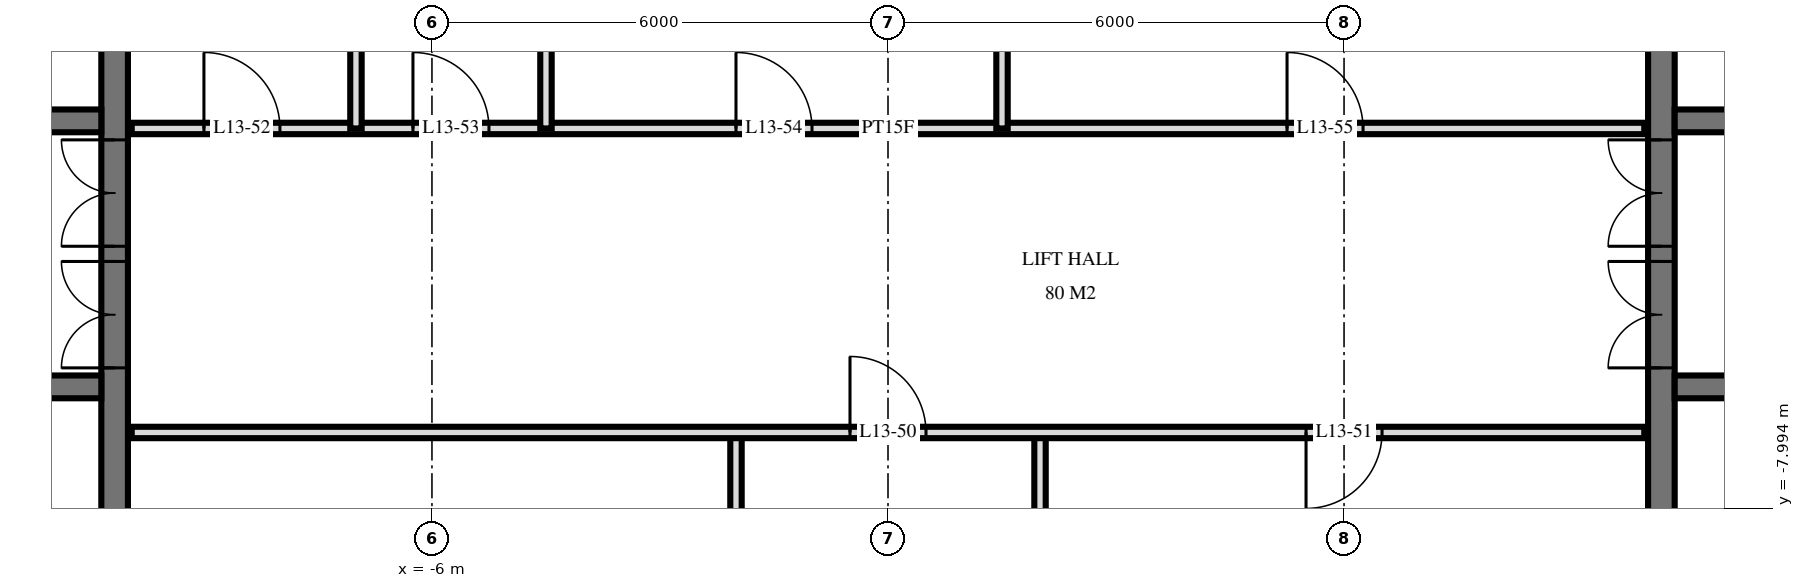
"""IFC4 building model, lengths in metres.
Left out: names, types, materials, properties, quantities, classifications, styles, units other than length and angle.
Written with IfcOpenShell. Run it as: python <this file> out.ifc"""

import sys

from ifc_helpers import new_model, si_unit, direction, frame, frame_2d, origin, place, context, subcontext, project, spatial, rectangle, extrude, element, fill, save


model = new_model("IFC4")
c1 = context("Model", 3, precision=1e-05, world=origin(), true_north=direction((0.0, 1.0)))
c2 = subcontext(c1, "Body", "Model", "MODEL_VIEW")
j1 = project(units=[si_unit("LENGTHUNIT", "METRE"), si_unit("PLANEANGLEUNIT", "RADIAN")], contexts=[c1])
p1 = place(None, origin())
s1 = spatial("IfcSite", under=j1, at=p1, CompositionType="ELEMENT")
p2 = place(p1, origin())
s2 = spatial("IfcBuilding", under=s1, at=p2, CompositionType="ELEMENT")
p3 = place(p2, frame((0.0, 0.0, 56.4)))
s3 = spatial("IfcBuildingStorey", under=s2, at=p3, CompositionType="ELEMENT", Elevation=56.4)
p4 = place(p3, frame((-10.175, -14.55, 0.0), z_axis=(0.0, 0.0, 1.0), x_axis=(0.0, 1.0, 0.0)))
e1 = element("IfcWall", 1, at=p4, inside=s3, PredefinedType="SHEAR", context=c2, shape_type="SweptSolid", body=[
    extrude(rectangle(XDim=14.1, YDim=0.35, at=frame_2d((7.05, 0.0))), origin(), (0.0, 0.0, 1.0), 3.6),
])
p5 = place(p4, frame((8.4, 0.0, 0.0)))
e2 = element("IfcOpeningElement", 2, at=p5, cuts=e1, PredefinedType="OPENING", context=c2, shape_type="SweptSolid", body=[
    extrude(rectangle(XDim=1.4, YDim=2.4, at=frame_2d((0.7, 1.2))), frame((0.0, 0.185, 0.0), z_axis=(0.0, -1.0, 0.0), x_axis=(1.0, 0.0, 0.0)), (0.0, 0.0, 1.0), 0.37),
])
p6 = place(p4, frame((10.0, 0.0, 0.0)))
e3 = element("IfcOpeningElement", 3, at=p6, cuts=e1, PredefinedType="OPENING", context=c2, shape_type="SweptSolid", body=[
    extrude(rectangle(XDim=1.4, YDim=2.4, at=frame_2d((0.7, 1.2))), frame((0.0, 0.185, 0.0), z_axis=(0.0, -1.0, 0.0), x_axis=(1.0, 0.0, 0.0)), (0.0, 0.0, 1.0), 0.37),
])
p7 = place(p4, frame((4.0, 0.0, 0.0)))
e4 = element("IfcOpeningElement", 4, at=p7, cuts=e1, PredefinedType="OPENING", context=c2, shape_type="SweptSolid", body=[
    extrude(rectangle(XDim=1.2, YDim=2.1, at=frame_2d((0.6, 1.05))), frame((0.0, 0.185, 0.0), z_axis=(0.0, -1.0, 0.0), x_axis=(1.0, 0.0, 0.0)), (0.0, 0.0, 1.0), 0.37),
])
p8 = place(p3, frame((-29.05, -2.9, 0.0), z_axis=(0.0, 0.0, 1.0), x_axis=(1.0, 0.0, 0.0)))
e5 = element("IfcWall", 5, at=p8, inside=s3, PredefinedType="SHEAR", context=c2, shape_type="SweptSolid", body=[
    extrude(rectangle(XDim=18.7, YDim=0.3, at=frame_2d((9.35, 0.0))), origin(), (0.0, 0.0, 1.0), 3.6),
])
p9 = place(p8, frame((2.95, 0.0, 0.0)))
e6 = element("IfcOpeningElement", 6, at=p9, cuts=e5, PredefinedType="OPENING", context=c2, shape_type="SweptSolid", body=[
    extrude(rectangle(XDim=1.1, YDim=2.1, at=frame_2d((0.55, 1.05))), frame((0.0, 0.16, 0.0), z_axis=(0.0, -1.0, 0.0), x_axis=(1.0, 0.0, 0.0)), (0.0, 0.0, 1.0), 0.32),
])
p10 = place(p8, frame((0.55, 0.0, 0.0)))
e7 = element("IfcOpeningElement", 7, at=p10, cuts=e5, PredefinedType="OPENING", context=c2, shape_type="SweptSolid", body=[
    extrude(rectangle(XDim=1.1, YDim=2.1, at=frame_2d((0.55, 1.05))), frame((0.0, 0.16, 0.0), z_axis=(0.0, -1.0, 0.0), x_axis=(1.0, 0.0, 0.0)), (0.0, 0.0, 1.0), 0.32),
])
p11 = place(p8, frame((10.9, 0.0, 0.0)))
e8 = element("IfcOpeningElement", 8, at=p11, cuts=e5, PredefinedType="OPENING", context=c2, shape_type="SweptSolid", body=[
    extrude(rectangle(XDim=0.9, YDim=2.1, at=frame_2d((0.45, 1.05))), frame((0.0, 0.16, 0.0), z_axis=(0.0, -1.0, 0.0), x_axis=(1.0, 0.0, 0.0)), (0.0, 0.0, 1.0), 0.32),
])
p12 = place(p8, frame((16.85, 0.0, 0.0)))
e9 = element("IfcOpeningElement", 9, at=p12, cuts=e5, PredefinedType="OPENING", context=c2, shape_type="SweptSolid", body=[
    extrude(rectangle(XDim=1.0, YDim=2.1, at=frame_2d((0.5, 1.05))), frame((0.0, 0.16, 0.0), z_axis=(0.0, -1.0, 0.0), x_axis=(1.0, 0.0, 0.0)), (0.0, 0.0, 1.0), 0.32),
])
p13 = place(p8, frame((13.85, 0.0, 0.0)))
e10 = element("IfcOpeningElement", 10, at=p13, cuts=e5, PredefinedType="OPENING", context=c2, shape_type="SweptSolid", body=[
    extrude(rectangle(XDim=1.0, YDim=2.1, at=frame_2d((0.5, 1.05))), frame((0.0, 0.16, 0.0), z_axis=(0.0, -1.0, 0.0), x_axis=(1.0, 0.0, 0.0)), (0.0, 0.0, 1.0), 0.32),
])
p14 = place(p8, frame((5.6, 0.0, 0.0)))
e11 = element("IfcOpeningElement", 11, at=p14, cuts=e5, PredefinedType="OPENING", context=c2, shape_type="SweptSolid", body=[
    extrude(rectangle(XDim=1.0, YDim=2.1, at=frame_2d((0.5, 1.05))), frame((0.0, 0.16, 0.0), z_axis=(0.0, -1.0, 0.0), x_axis=(1.0, 0.0, 0.0)), (0.0, 0.0, 1.0), 0.32),
])
p15 = place(p3, frame((-29.05, -6.4, 0.0), z_axis=(0.0, 0.0, 1.0), x_axis=(1.0, 0.0, 0.0)))
e12 = element("IfcWall", 12, at=p15, inside=s3, PredefinedType="SHEAR", context=c2, shape_type="SweptSolid", body=[
    extrude(rectangle(XDim=18.7, YDim=0.3, at=frame_2d((9.35, 0.0))), origin(), (0.0, 0.0, 1.0), 3.6),
])
p16 = place(p15, frame((2.95, 0.0, 0.0)))
e13 = element("IfcOpeningElement", 13, at=p16, cuts=e12, PredefinedType="OPENING", context=c2, shape_type="SweptSolid", body=[
    extrude(rectangle(XDim=1.1, YDim=2.1, at=frame_2d((0.55, 1.05))), frame((0.0, 0.16, 0.0), z_axis=(0.0, -1.0, 0.0), x_axis=(1.0, 0.0, 0.0)), (0.0, 0.0, 1.0), 0.32),
])
p17 = place(p15, frame((0.55, 0.0, 0.0)))
e14 = element("IfcOpeningElement", 14, at=p17, cuts=e12, PredefinedType="OPENING", context=c2, shape_type="SweptSolid", body=[
    extrude(rectangle(XDim=1.1, YDim=2.1, at=frame_2d((0.55, 1.05))), frame((0.0, 0.16, 0.0), z_axis=(0.0, -1.0, 0.0), x_axis=(1.0, 0.0, 0.0)), (0.0, 0.0, 1.0), 0.32),
])
p18 = place(p15, frame((10.8, 0.0, 0.0)))
e15 = element("IfcOpeningElement", 15, at=p18, cuts=e12, PredefinedType="OPENING", context=c2, shape_type="SweptSolid", body=[
    extrude(rectangle(XDim=1.1, YDim=2.1, at=frame_2d((0.55, 1.05))), frame((0.0, 0.16, 0.0), z_axis=(0.0, -1.0, 0.0), x_axis=(1.0, 0.0, 0.0)), (0.0, 0.0, 1.0), 0.32),
])
p19 = place(p15, frame((5.6, 0.0, 0.0)))
e16 = element("IfcOpeningElement", 16, at=p19, cuts=e12, PredefinedType="OPENING", context=c2, shape_type="SweptSolid", body=[
    extrude(rectangle(XDim=1.0, YDim=2.1, at=frame_2d((0.5, 1.05))), frame((0.0, 0.16, 0.0), z_axis=(0.0, -1.0, 0.0), x_axis=(1.0, 0.0, 0.0)), (0.0, 0.0, 1.0), 0.32),
])
p20 = place(p3, frame((10.175, -14.55, 0.0), z_axis=(0.0, 0.0, 1.0), x_axis=(0.0, 1.0, 0.0)))
e17 = element("IfcWall", 17, at=p20, inside=s3, PredefinedType="SHEAR", context=c2, shape_type="SweptSolid", body=[
    extrude(rectangle(XDim=14.1, YDim=0.35, at=frame_2d((7.05, 0.0))), origin(), (0.0, 0.0, 1.0), 3.6),
])
p21 = place(p20, frame((8.4, 0.0, 0.0)))
e18 = element("IfcOpeningElement", 18, at=p21, cuts=e17, PredefinedType="OPENING", context=c2, shape_type="SweptSolid", body=[
    extrude(rectangle(XDim=1.4, YDim=2.4, at=frame_2d((0.7, 1.2))), frame((0.0, 0.185, 0.0), z_axis=(0.0, -1.0, 0.0), x_axis=(1.0, 0.0, 0.0)), (0.0, 0.0, 1.0), 0.37),
])
p22 = place(p20, frame((10.0, 0.0, 0.0)))
e19 = element("IfcOpeningElement", 19, at=p22, cuts=e17, PredefinedType="OPENING", context=c2, shape_type="SweptSolid", body=[
    extrude(rectangle(XDim=1.4, YDim=2.4, at=frame_2d((0.7, 1.2))), frame((0.0, 0.185, 0.0), z_axis=(0.0, -1.0, 0.0), x_axis=(1.0, 0.0, 0.0)), (0.0, 0.0, 1.0), 0.37),
])
p23 = place(p20, frame((4.0, 0.0, 0.0)))
e20 = element("IfcOpeningElement", 20, at=p23, cuts=e17, PredefinedType="OPENING", context=c2, shape_type="SweptSolid", body=[
    extrude(rectangle(XDim=1.2, YDim=2.1, at=frame_2d((0.6, 1.05))), frame((0.0, 0.185, 0.0), z_axis=(0.0, -1.0, 0.0), x_axis=(1.0, 0.0, 0.0)), (0.0, 0.0, 1.0), 0.37),
])
p24 = place(p3, frame((10.35, -2.9, 0.0), z_axis=(0.0, 0.0, 1.0), x_axis=(1.0, 0.0, 0.0)))
e21 = element("IfcWall", 21, at=p24, inside=s3, PredefinedType="SHEAR", context=c2, shape_type="SweptSolid", body=[
    extrude(rectangle(XDim=18.7, YDim=0.3, at=frame_2d((9.35, 0.0))), origin(), (0.0, 0.0, 1.0), 3.6),
])
p25 = place(p24, frame((14.65, 0.0, 0.0)))
e22 = element("IfcOpeningElement", 22, at=p25, cuts=e21, PredefinedType="OPENING", context=c2, shape_type="SweptSolid", body=[
    extrude(rectangle(XDim=1.1, YDim=2.1, at=frame_2d((0.55, 1.05))), frame((0.0, 0.16, 0.0), z_axis=(0.0, -1.0, 0.0), x_axis=(1.0, 0.0, 0.0)), (0.0, 0.0, 1.0), 0.32),
])
p26 = place(p24, frame((17.05, 0.0, 0.0)))
e23 = element("IfcOpeningElement", 23, at=p26, cuts=e21, PredefinedType="OPENING", context=c2, shape_type="SweptSolid", body=[
    extrude(rectangle(XDim=1.1, YDim=2.1, at=frame_2d((0.55, 1.05))), frame((0.0, 0.16, 0.0), z_axis=(0.0, -1.0, 0.0), x_axis=(1.0, 0.0, 0.0)), (0.0, 0.0, 1.0), 0.32),
])
p27 = place(p24, frame((6.9, 0.0, 0.0)))
e24 = element("IfcOpeningElement", 24, at=p27, cuts=e21, PredefinedType="OPENING", context=c2, shape_type="SweptSolid", body=[
    extrude(rectangle(XDim=0.9, YDim=2.1, at=frame_2d((0.45, 1.05))), frame((0.0, 0.16, 0.0), z_axis=(0.0, -1.0, 0.0), x_axis=(1.0, 0.0, 0.0)), (0.0, 0.0, 1.0), 0.32),
])
p28 = place(p24, frame((0.85, 0.0, 0.0)))
e25 = element("IfcOpeningElement", 25, at=p28, cuts=e21, PredefinedType="OPENING", context=c2, shape_type="SweptSolid", body=[
    extrude(rectangle(XDim=1.0, YDim=2.1, at=frame_2d((0.5, 1.05))), frame((0.0, 0.16, 0.0), z_axis=(0.0, -1.0, 0.0), x_axis=(1.0, 0.0, 0.0)), (0.0, 0.0, 1.0), 0.32),
])
p29 = place(p24, frame((3.85, 0.0, 0.0)))
e26 = element("IfcOpeningElement", 26, at=p29, cuts=e21, PredefinedType="OPENING", context=c2, shape_type="SweptSolid", body=[
    extrude(rectangle(XDim=1.0, YDim=2.1, at=frame_2d((0.5, 1.05))), frame((0.0, 0.16, 0.0), z_axis=(0.0, -1.0, 0.0), x_axis=(1.0, 0.0, 0.0)), (0.0, 0.0, 1.0), 0.32),
])
p30 = place(p24, frame((12.1, 0.0, 0.0)))
e27 = element("IfcOpeningElement", 27, at=p30, cuts=e21, PredefinedType="OPENING", context=c2, shape_type="SweptSolid", body=[
    extrude(rectangle(XDim=1.0, YDim=2.1, at=frame_2d((0.5, 1.05))), frame((0.0, 0.16, 0.0), z_axis=(0.0, -1.0, 0.0), x_axis=(1.0, 0.0, 0.0)), (0.0, 0.0, 1.0), 0.32),
])
p31 = place(p3, frame((10.35, -6.4, 0.0), z_axis=(0.0, 0.0, 1.0), x_axis=(1.0, 0.0, 0.0)))
e28 = element("IfcWall", 28, at=p31, inside=s3, PredefinedType="SHEAR", context=c2, shape_type="SweptSolid", body=[
    extrude(rectangle(XDim=18.7, YDim=0.3, at=frame_2d((9.35, 0.0))), origin(), (0.0, 0.0, 1.0), 3.6),
])
p32 = place(p31, frame((14.65, 0.0, 0.0)))
e29 = element("IfcOpeningElement", 29, at=p32, cuts=e28, PredefinedType="OPENING", context=c2, shape_type="SweptSolid", body=[
    extrude(rectangle(XDim=1.1, YDim=2.1, at=frame_2d((0.55, 1.05))), frame((0.0, 0.16, 0.0), z_axis=(0.0, -1.0, 0.0), x_axis=(1.0, 0.0, 0.0)), (0.0, 0.0, 1.0), 0.32),
])
p33 = place(p31, frame((17.05, 0.0, 0.0)))
e30 = element("IfcOpeningElement", 30, at=p33, cuts=e28, PredefinedType="OPENING", context=c2, shape_type="SweptSolid", body=[
    extrude(rectangle(XDim=1.1, YDim=2.1, at=frame_2d((0.55, 1.05))), frame((0.0, 0.16, 0.0), z_axis=(0.0, -1.0, 0.0), x_axis=(1.0, 0.0, 0.0)), (0.0, 0.0, 1.0), 0.32),
])
p34 = place(p31, frame((6.8, 0.0, 0.0)))
e31 = element("IfcOpeningElement", 31, at=p34, cuts=e28, PredefinedType="OPENING", context=c2, shape_type="SweptSolid", body=[
    extrude(rectangle(XDim=1.1, YDim=2.1, at=frame_2d((0.55, 1.05))), frame((0.0, 0.16, 0.0), z_axis=(0.0, -1.0, 0.0), x_axis=(1.0, 0.0, 0.0)), (0.0, 0.0, 1.0), 0.32),
])
p35 = place(p31, frame((12.1, 0.0, 0.0)))
e32 = element("IfcOpeningElement", 32, at=p35, cuts=e28, PredefinedType="OPENING", context=c2, shape_type="SweptSolid", body=[
    extrude(rectangle(XDim=1.0, YDim=2.1, at=frame_2d((0.5, 1.05))), frame((0.0, 0.16, 0.0), z_axis=(0.0, -1.0, 0.0), x_axis=(1.0, 0.0, 0.0)), (0.0, 0.0, 1.0), 0.32),
])
p36 = place(p3, frame((2.0, -11.0, 0.0), z_axis=(0.0, 0.0, 1.0), x_axis=(0.0, 1.0, 0.0)))
e33 = element("IfcWall", 33, at=p36, inside=s3, PredefinedType="PARTITIONING", context=c2, shape_type="SweptSolid", body=[
    extrude(rectangle(XDim=4.0, YDim=0.15, at=frame_2d((2.0, 0.0))), origin(), (0.0, 0.0, 1.0), 3.32),
])
p37 = place(p3, frame((1.5, -3.0, 0.0), z_axis=(0.0, 0.0, 1.0), x_axis=(0.0, 1.0, 0.0)))
e34 = element("IfcWall", 34, at=p37, inside=s3, PredefinedType="PARTITIONING", context=c2, shape_type="SweptSolid", body=[
    extrude(rectangle(XDim=4.02, YDim=0.15, at=frame_2d((2.01, 0.0))), origin(), (0.0, 0.0, 1.0), 3.32),
])
p38 = place(p3, frame((-2.0, -11.0, 0.0), z_axis=(0.0, 0.0, 1.0), x_axis=(0.0, 1.0, 0.0)))
e35 = element("IfcWall", 35, at=p38, inside=s3, PredefinedType="PARTITIONING", context=c2, shape_type="SweptSolid", body=[
    extrude(rectangle(XDim=4.0, YDim=0.15, at=frame_2d((2.0, 0.0))), origin(), (0.0, 0.0, 1.0), 3.32),
])
for number, where, z_axis, x_axis in (
    (36, (-4.5, -3.0, 0.0), (0.0, 0.0, 1.0), (0.0, 1.0, 0.0)),
    (37, (-7.0, -3.0, 0.0), (0.0, 0.0, 1.0), (0.0, 1.0, 0.0)),
):
    element("IfcWall", number, at=place(p3, frame(where, z_axis=z_axis, x_axis=x_axis)), inside=s3, PredefinedType="PLUMBINGWALL", context=c2, shape_type="SweptSolid", body=[
        extrude(rectangle(XDim=4.02, YDim=0.15, at=frame_2d((2.01, 0.0))), origin(), (0.0, 0.0, 1.0), 3.32),
    ])
p39 = place(p3, frame((-9.95, -7.0, 0.0), z_axis=(0.0, 0.0, 1.0), x_axis=(1.0, 0.0, 0.0)))
e38 = element("IfcWall", 38, at=p39, inside=s3, PredefinedType="PARTITIONING", context=c2, shape_type="SweptSolid", body=[
    extrude(rectangle(XDim=19.9, YDim=0.15, at=frame_2d((9.95, 0.0))), origin(), (0.0, 0.0, 1.0), 3.32),
])
p40 = place(p39, frame((9.45, 0.0, 0.0)))
e39 = element("IfcOpeningElement", 39, at=p40, cuts=e38, PredefinedType="OPENING", context=c2, shape_type="SweptSolid", body=[
    extrude(rectangle(XDim=1.0, YDim=2.1, at=frame_2d((0.5, 1.05))), frame((0.0, 0.085, 0.0), z_axis=(0.0, -1.0, 0.0), x_axis=(1.0, 0.0, 0.0)), (0.0, 0.0, 1.0), 0.17),
])
p41 = place(p39, frame((15.45, 0.0, 0.0)))
e40 = element("IfcOpeningElement", 40, at=p41, cuts=e38, PredefinedType="OPENING", context=c2, shape_type="SweptSolid", body=[
    extrude(rectangle(XDim=1.0, YDim=2.1, at=frame_2d((0.5, 1.05))), frame((0.0, 0.085, 0.0), z_axis=(0.0, -1.0, 0.0), x_axis=(1.0, 0.0, 0.0)), (0.0, 0.0, 1.0), 0.17),
])
p42 = place(p3, frame((-9.95, -3.0, 0.0), z_axis=(0.0, 0.0, 1.0), x_axis=(1.0, 0.0, 0.0)))
e41 = element("IfcWall", 41, at=p42, inside=s3, PredefinedType="PARTITIONING", context=c2, shape_type="SweptSolid", body=[
    extrude(rectangle(XDim=19.9, YDim=0.15, at=frame_2d((9.95, 0.0))), origin(), (0.0, 0.0, 1.0), 3.32),
])
p43 = place(p42, frame((0.95, 0.0, 0.0)))
e42 = element("IfcOpeningElement", 42, at=p43, cuts=e41, PredefinedType="OPENING", context=c2, shape_type="SweptSolid", body=[
    extrude(rectangle(XDim=1.0, YDim=2.1, at=frame_2d((0.5, 1.05))), frame((0.0, 0.085, 0.0), z_axis=(0.0, -1.0, 0.0), x_axis=(1.0, 0.0, 0.0)), (0.0, 0.0, 1.0), 0.17),
])
p44 = place(p42, frame((3.7, 0.0, 0.0)))
e43 = element("IfcOpeningElement", 43, at=p44, cuts=e41, PredefinedType="OPENING", context=c2, shape_type="SweptSolid", body=[
    extrude(rectangle(XDim=1.0, YDim=2.1, at=frame_2d((0.5, 1.05))), frame((0.0, 0.085, 0.0), z_axis=(0.0, -1.0, 0.0), x_axis=(1.0, 0.0, 0.0)), (0.0, 0.0, 1.0), 0.17),
])
p45 = place(p42, frame((7.95, 0.0, 0.0)))
e44 = element("IfcOpeningElement", 44, at=p45, cuts=e41, PredefinedType="OPENING", context=c2, shape_type="SweptSolid", body=[
    extrude(rectangle(XDim=1.0, YDim=2.1, at=frame_2d((0.5, 1.05))), frame((0.0, 0.085, 0.0), z_axis=(0.0, -1.0, 0.0), x_axis=(1.0, 0.0, 0.0)), (0.0, 0.0, 1.0), 0.17),
])
p46 = place(p42, frame((15.2, 0.0, 0.0)))
e45 = element("IfcOpeningElement", 45, at=p46, cuts=e41, PredefinedType="OPENING", context=c2, shape_type="SweptSolid", body=[
    extrude(rectangle(XDim=1.0, YDim=2.1, at=frame_2d((0.5, 1.05))), frame((0.0, 0.085, 0.0), z_axis=(0.0, -1.0, 0.0), x_axis=(1.0, 0.0, 0.0)), (0.0, 0.0, 1.0), 0.17),
])
p47 = place(p5, origin())
e46 = element("IfcDoor", 46, at=p47, inside=s3, OperationType="DOUBLE_DOOR_SINGLE_SWING", PredefinedType="DOOR", context=c2, shape_type="SweptSolid", body=[
    extrude(rectangle(XDim=1.4, YDim=2.4, at=frame_2d((0.7, 1.2))), frame((0.0, 0.025, 0.0), z_axis=(0.0, -1.0, 0.0), x_axis=(1.0, 0.0, 0.0)), (0.0, 0.0, 1.0), 0.05),
])
fill(e2, e46)
p48 = place(p6, origin())
e47 = element("IfcDoor", 47, at=p48, inside=s3, OperationType="DOUBLE_DOOR_SINGLE_SWING", PredefinedType="DOOR", context=c2, shape_type="SweptSolid", body=[
    extrude(rectangle(XDim=1.4, YDim=2.4, at=frame_2d((0.7, 1.2))), frame((0.0, 0.025, 0.0), z_axis=(0.0, -1.0, 0.0), x_axis=(1.0, 0.0, 0.0)), (0.0, 0.0, 1.0), 0.05),
])
fill(e3, e47)
p49 = place(p21, origin())
e48 = element("IfcDoor", 48, at=p49, inside=s3, OperationType="DOUBLE_DOOR_SINGLE_SWING", PredefinedType="DOOR", context=c2, shape_type="SweptSolid", body=[
    extrude(rectangle(XDim=1.4, YDim=2.4, at=frame_2d((0.7, 1.2))), frame((0.0, 0.025, 0.0), z_axis=(0.0, -1.0, 0.0), x_axis=(1.0, 0.0, 0.0)), (0.0, 0.0, 1.0), 0.05),
])
fill(e18, e48)
p50 = place(p22, origin())
e49 = element("IfcDoor", 49, at=p50, inside=s3, OperationType="DOUBLE_DOOR_SINGLE_SWING", PredefinedType="DOOR", context=c2, shape_type="SweptSolid", body=[
    extrude(rectangle(XDim=1.4, YDim=2.4, at=frame_2d((0.7, 1.2))), frame((0.0, 0.025, 0.0), z_axis=(0.0, -1.0, 0.0), x_axis=(1.0, 0.0, 0.0)), (0.0, 0.0, 1.0), 0.05),
])
fill(e19, e49)
p51 = place(p40, origin())
e50 = element("IfcDoor", 50, at=p51, inside=s3, OperationType="SINGLE_SWING_RIGHT", PredefinedType="DOOR", context=c2, shape_type="SweptSolid", body=[
    extrude(rectangle(XDim=1.0, YDim=2.1, at=frame_2d((0.5, 1.05))), frame((0.0, 0.025, 0.0), z_axis=(0.0, -1.0, 0.0), x_axis=(1.0, 0.0, 0.0)), (0.0, 0.0, 1.0), 0.05),
])
fill(e39, e50)
p52 = place(p41, frame((0.5, 0.0, 0.0), z_axis=(0.0, 0.0, 1.0), x_axis=(-1.0, 0.0, 0.0)))
e51 = element("IfcDoor", 51, at=p52, inside=s3, OperationType="SINGLE_SWING_LEFT", PredefinedType="DOOR", context=c2, shape_type="SweptSolid", body=[
    extrude(rectangle(XDim=1.0, YDim=2.1, at=frame_2d((0.0, 1.05))), frame((0.0, -0.025, 0.0), z_axis=(0.0, 1.0, 0.0), x_axis=(-1.0, 0.0, 0.0)), (0.0, 0.0, 1.0), 0.05),
])
fill(e40, e51)
p53 = place(p43, origin())
e52 = element("IfcDoor", 52, at=p53, inside=s3, OperationType="SINGLE_SWING_RIGHT", PredefinedType="DOOR", context=c2, shape_type="SweptSolid", body=[
    extrude(rectangle(XDim=1.0, YDim=2.1, at=frame_2d((0.5, 1.05))), frame((0.0, 0.025, 0.0), z_axis=(0.0, -1.0, 0.0), x_axis=(1.0, 0.0, 0.0)), (0.0, 0.0, 1.0), 0.05),
])
fill(e42, e52)
p54 = place(p44, origin())
e53 = element("IfcDoor", 53, at=p54, inside=s3, OperationType="SINGLE_SWING_RIGHT", PredefinedType="DOOR", context=c2, shape_type="SweptSolid", body=[
    extrude(rectangle(XDim=1.0, YDim=2.1, at=frame_2d((0.5, 1.05))), frame((0.0, 0.025, 0.0), z_axis=(0.0, -1.0, 0.0), x_axis=(1.0, 0.0, 0.0)), (0.0, 0.0, 1.0), 0.05),
])
fill(e43, e53)
p55 = place(p45, origin())
e54 = element("IfcDoor", 54, at=p55, inside=s3, OperationType="SINGLE_SWING_RIGHT", PredefinedType="DOOR", context=c2, shape_type="SweptSolid", body=[
    extrude(rectangle(XDim=1.0, YDim=2.1, at=frame_2d((0.5, 1.05))), frame((0.0, 0.025, 0.0), z_axis=(0.0, -1.0, 0.0), x_axis=(1.0, 0.0, 0.0)), (0.0, 0.0, 1.0), 0.05),
])
fill(e44, e54)
p56 = place(p46, origin())
e55 = element("IfcDoor", 55, at=p56, inside=s3, OperationType="SINGLE_SWING_RIGHT", PredefinedType="DOOR", context=c2, shape_type="SweptSolid", body=[
    extrude(rectangle(XDim=1.0, YDim=2.1, at=frame_2d((0.5, 1.05))), frame((0.0, 0.025, 0.0), z_axis=(0.0, -1.0, 0.0), x_axis=(1.0, 0.0, 0.0)), (0.0, 0.0, 1.0), 0.05),
])
fill(e45, e55)
save(model, sys.argv[1])
